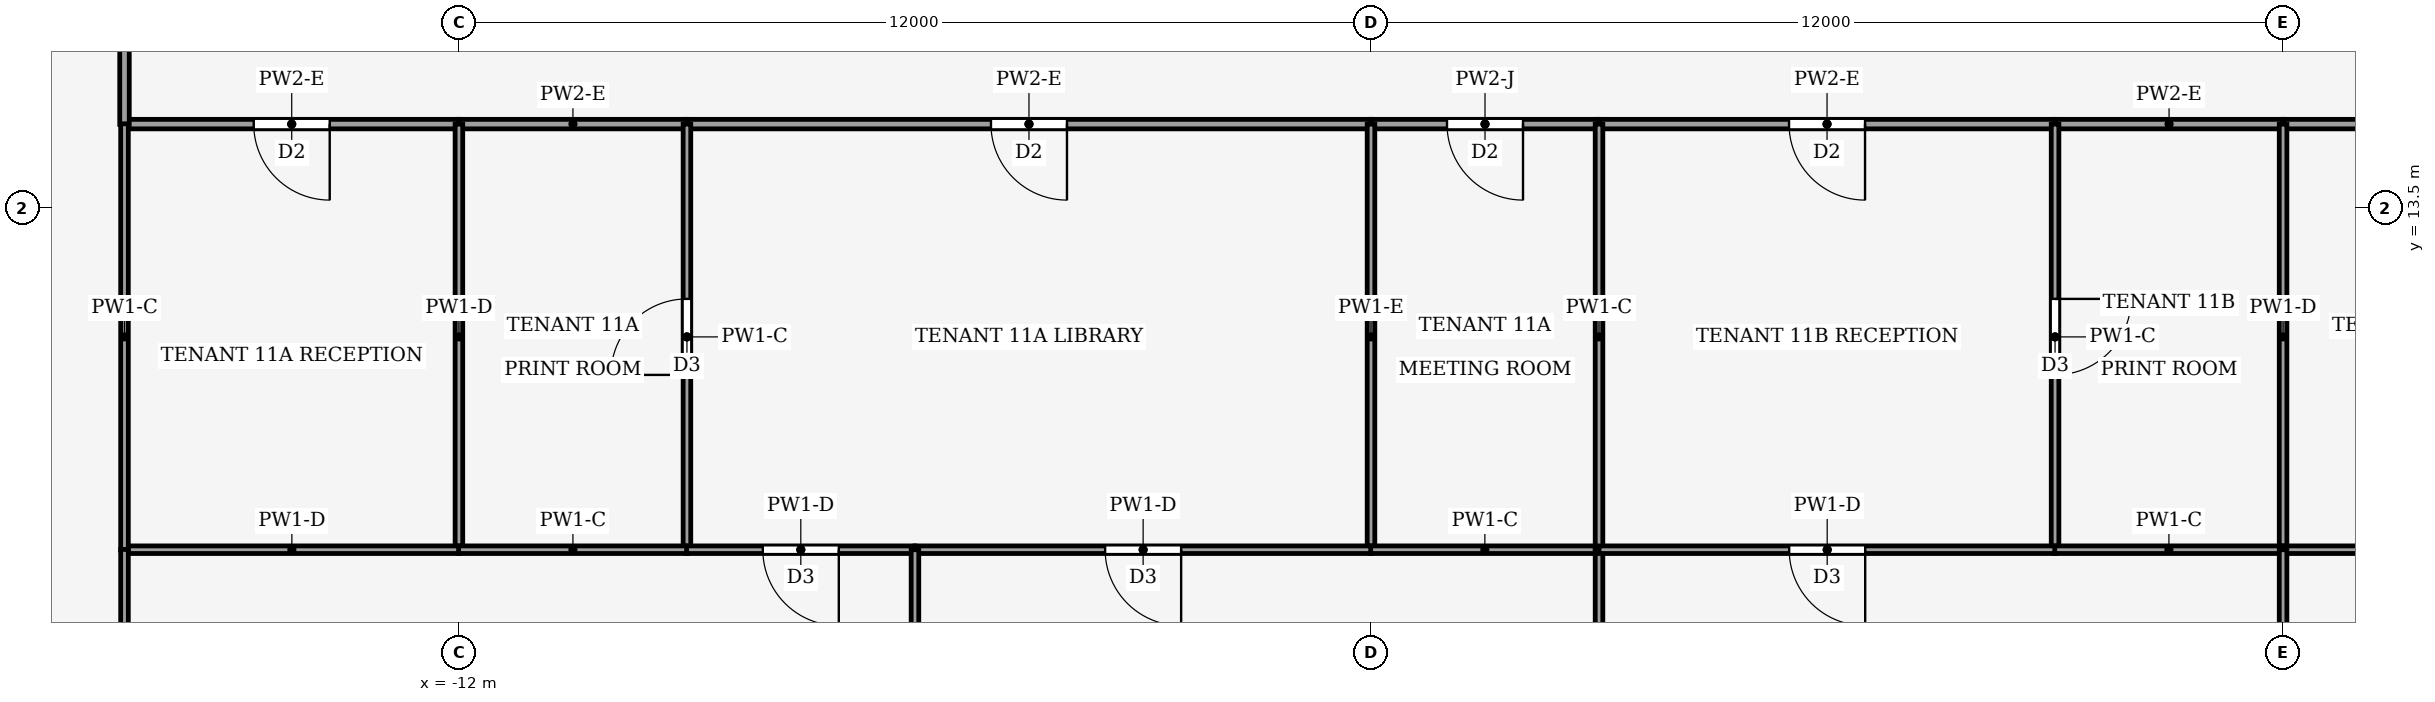
"""IFC4 building model, lengths in metres.
Left out: names, types, materials, properties, quantities, classifications, styles, units other than length and angle.
Written with IfcOpenShell. Run it as: python <this file> out.ifc"""

import sys

from ifc_helpers import new_model, si_unit, direction, frame, frame_2d, origin, place, context, subcontext, project, spatial, rectangle, extrude, element, fill, save


model = new_model("IFC4")
c1 = context("Model", 3, precision=1e-05, world=origin(), true_north=direction((0.0, 1.0)))
c2 = subcontext(c1, "Body", "Model", "MODEL_VIEW")
j1 = project(units=[si_unit("LENGTHUNIT", "METRE"), si_unit("PLANEANGLEUNIT", "RADIAN")], contexts=[c1])
p1 = place(None, origin())
s1 = spatial("IfcSite", under=j1, at=p1, CompositionType="ELEMENT")
p2 = place(p1, origin())
s2 = spatial("IfcBuilding", under=s1, at=p2, CompositionType="ELEMENT")
p3 = place(p2, frame((0.0, 0.0, 50.0)))
s3 = spatial("IfcBuildingStorey", under=s2, at=p3, CompositionType="ELEMENT", Elevation=50.0)
p4 = place(p3, frame((-12.0, 14.6, 0.0), z_axis=(0.0, 0.0, 1.0), x_axis=(-1.0, 0.0, 0.0)))
e1 = element("IfcWall", 1, at=p4, inside=s3, PredefinedType="PARTITIONING", context=c2, shape_type="SweptSolid", body=[
    extrude(rectangle(XDim=4.4, YDim=0.125, at=frame_2d((2.2, 0.0))), origin(), (0.0, 0.0, 1.0), 3.29),
])
p5 = place(p4, frame((1.7, 0.0, 0.0)))
e2 = element("IfcOpeningElement", 2, at=p5, cuts=e1, PredefinedType="OPENING", context=c2, shape_type="SweptSolid", body=[
    extrude(rectangle(XDim=1.0, YDim=2.1, at=frame_2d((0.5, 1.05))), frame((0.0, 0.073, 0.0), z_axis=(0.0, -1.0, 0.0), x_axis=(1.0, 0.0, 0.0)), (0.0, 0.0, 1.0), 0.145),
])
p6 = place(p3, frame((-12.0, 14.6, 0.0), z_axis=(0.0, 0.0, 1.0), x_axis=(1.0, 0.0, 0.0)))
e3 = element("IfcWall", 3, at=p6, inside=s3, PredefinedType="PARTITIONING", context=c2, shape_type="SweptSolid", body=[
    extrude(rectangle(XDim=3.0, YDim=0.125, at=frame_2d((1.5, 0.0))), origin(), (0.0, 0.0, 1.0), 3.29),
])
p7 = place(p3, frame((0.0, 14.6, 0.0), z_axis=(0.0, 0.0, 1.0), x_axis=(-1.0, 0.0, 0.0)))
e4 = element("IfcWall", 4, at=p7, inside=s3, PredefinedType="PARTITIONING", context=c2, shape_type="SweptSolid", body=[
    extrude(rectangle(XDim=9.0, YDim=0.125, at=frame_2d((4.5, 0.0))), origin(), (0.0, 0.0, 1.0), 3.29),
])
p8 = place(p7, frame((4.0, 0.0, 0.0)))
e5 = element("IfcOpeningElement", 5, at=p8, cuts=e4, PredefinedType="OPENING", context=c2, shape_type="SweptSolid", body=[
    extrude(rectangle(XDim=1.0, YDim=2.1, at=frame_2d((0.5, 1.05))), frame((0.0, 0.073, 0.0), z_axis=(0.0, -1.0, 0.0), x_axis=(1.0, 0.0, 0.0)), (0.0, 0.0, 1.0), 0.145),
])
p9 = place(p3, frame((3.0, 14.6, 0.0), z_axis=(0.0, 0.0, 1.0), x_axis=(-1.0, 0.0, 0.0)))
e6 = element("IfcWall", 6, at=p9, inside=s3, PredefinedType="PARTITIONING", context=c2, shape_type="SweptSolid", body=[
    extrude(rectangle(XDim=3.0, YDim=0.125, at=frame_2d((1.5, 0.0))), origin(), (0.0, 0.0, 1.0), 3.34),
])
p10 = place(p9, frame((1.0, 0.0, 0.0)))
e7 = element("IfcOpeningElement", 7, at=p10, cuts=e6, PredefinedType="OPENING", context=c2, shape_type="SweptSolid", body=[
    extrude(rectangle(XDim=1.0, YDim=2.1, at=frame_2d((0.5, 1.05))), frame((0.0, 0.073, 0.0), z_axis=(0.0, -1.0, 0.0), x_axis=(1.0, 0.0, 0.0)), (0.0, 0.0, 1.0), 0.145),
])
p11 = place(p3, frame((9.0, 14.6, 0.0), z_axis=(0.0, 0.0, 1.0), x_axis=(-1.0, 0.0, 0.0)))
e8 = element("IfcWall", 8, at=p11, inside=s3, PredefinedType="PARTITIONING", context=c2, shape_type="SweptSolid", body=[
    extrude(rectangle(XDim=6.0, YDim=0.125, at=frame_2d((3.0, 0.0))), origin(), (0.0, 0.0, 1.0), 3.29),
])
p12 = place(p11, frame((2.5, 0.0, 0.0)))
e9 = element("IfcOpeningElement", 9, at=p12, cuts=e8, PredefinedType="OPENING", context=c2, shape_type="SweptSolid", body=[
    extrude(rectangle(XDim=1.0, YDim=2.1, at=frame_2d((0.5, 1.05))), frame((0.0, 0.073, 0.0), z_axis=(0.0, -1.0, 0.0), x_axis=(1.0, 0.0, 0.0)), (0.0, 0.0, 1.0), 0.145),
])
p13 = place(p3, frame((9.0, 14.6, 0.0), z_axis=(0.0, 0.0, 1.0), x_axis=(1.0, 0.0, 0.0)))
e10 = element("IfcWall", 10, at=p13, inside=s3, PredefinedType="PARTITIONING", context=c2, shape_type="SweptSolid", body=[
    extrude(rectangle(XDim=3.0, YDim=0.125, at=frame_2d((1.5, 0.0))), origin(), (0.0, 0.0, 1.0), 3.29),
])
p14 = place(p3, frame((16.4, 14.6, 0.0), z_axis=(0.0, 0.0, 1.0), x_axis=(-1.0, 0.0, 0.0)))
e11 = element("IfcWall", 11, at=p14, inside=s3, PredefinedType="PARTITIONING", context=c2, shape_type="SweptSolid", body=[
    extrude(rectangle(XDim=4.4, YDim=0.125, at=frame_2d((2.2, 0.0))), origin(), (0.0, 0.0, 1.0), 3.29),
])
p15 = place(p14, frame((1.7, 0.0, 0.0)))
e12 = element("IfcOpeningElement", 12, at=p15, cuts=e11, PredefinedType="OPENING", context=c2, shape_type="SweptSolid", body=[
    extrude(rectangle(XDim=1.0, YDim=2.1, at=frame_2d((0.5, 1.05))), frame((0.0, 0.073, 0.0), z_axis=(0.0, -1.0, 0.0), x_axis=(1.0, 0.0, 0.0)), (0.0, 0.0, 1.0), 0.145),
])
p16 = place(p3, frame((-16.4, 14.596, 0.0), z_axis=(0.0, 0.0, 1.0), x_axis=(0.0, 1.0, 0.0)))
e13 = element("IfcWall", 13, at=p16, inside=s3, PredefinedType="PARTITIONING", context=c2, shape_type="SweptSolid", body=[
    extrude(rectangle(XDim=3.404, YDim=0.125, at=frame_2d((1.702, 0.0))), origin(), (0.0, 0.0, 1.0), 3.14),
])
p17 = place(p16, frame((1.602, 0.0, 0.0)))
e14 = element("IfcOpeningElement", 14, at=p17, cuts=e13, PredefinedType="OPENING", context=c2, shape_type="SweptSolid", body=[
    extrude(rectangle(XDim=1.0, YDim=2.1, at=frame_2d((0.5, 1.05))), frame((0.0, 0.073, 0.0), z_axis=(0.0, -1.0, 0.0), x_axis=(1.0, 0.0, 0.0)), (0.0, 0.0, 1.0), 0.145),
])
p18 = place(p3, frame((-12.0, 9.0, 0.0), z_axis=(0.0, 0.0, 1.0), x_axis=(0.0, 1.0, 0.0)))
e15 = element("IfcWall", 15, at=p18, inside=s3, PredefinedType="PARTITIONING", context=c2, shape_type="SweptSolid", body=[
    extrude(rectangle(XDim=5.6, YDim=0.1, at=frame_2d((2.8, 0.0))), origin(), (0.0, 0.0, 1.0), 3.29),
])
p19 = place(p3, frame((-16.4, 9.0, 0.0), z_axis=(0.0, 0.0, 1.0), x_axis=(1.0, 0.0, 0.0)))
e16 = element("IfcWall", 16, at=p19, inside=s3, PredefinedType="PARTITIONING", context=c2, shape_type="SweptSolid", body=[
    extrude(rectangle(XDim=4.404, YDim=0.1, at=frame_2d((2.202, 0.0))), origin(), (0.0, 0.0, 1.0), 3.29),
])
p20 = place(p3, frame((-16.4, 14.604, 0.0), z_axis=(0.0, 0.0, 1.0), x_axis=(0.0, -1.0, 0.0)))
e17 = element("IfcWall", 17, at=p20, inside=s3, PredefinedType="PARTITIONING", context=c2, shape_type="SweptSolid", body=[
    extrude(rectangle(XDim=5.608, YDim=0.1, at=frame_2d((2.804, 0.0))), origin(), (0.0, 0.0, 1.0), 3.87),
])
p21 = place(p3, frame((-9.0, 9.0, 0.0), z_axis=(0.0, 0.0, 1.0), x_axis=(0.0, 1.0, 0.0)))
e18 = element("IfcWall", 18, at=p21, inside=s3, PredefinedType="PARTITIONING", context=c2, shape_type="SweptSolid", body=[
    extrude(rectangle(XDim=5.6, YDim=0.1, at=frame_2d((2.8, 0.0))), origin(), (0.0, 0.0, 1.0), 3.87),
])
p22 = place(p21, frame((2.3, 0.0, 0.0)))
e19 = element("IfcOpeningElement", 19, at=p22, cuts=e18, PredefinedType="OPENING", context=c2, shape_type="SweptSolid", body=[
    extrude(rectangle(XDim=1.0, YDim=2.1, at=frame_2d((0.5, 1.05))), frame((0.0, 0.06, 0.0), z_axis=(0.0, -1.0, 0.0), x_axis=(1.0, 0.0, 0.0)), (0.0, 0.0, 1.0), 0.12),
])
p23 = place(p3, frame((-12.004, 9.0, 0.0), z_axis=(0.0, 0.0, 1.0), x_axis=(1.0, 0.0, 0.0)))
e20 = element("IfcWall", 20, at=p23, inside=s3, PredefinedType="PARTITIONING", context=c2, shape_type="SweptSolid", body=[
    extrude(rectangle(XDim=3.008, YDim=0.1, at=frame_2d((1.504, 0.0))), origin(), (0.0, 0.0, 1.0), 3.87),
])
p24 = place(p3, frame((0.0, 9.0, 0.0), z_axis=(0.0, 0.0, 1.0), x_axis=(0.0, 1.0, 0.0)))
e21 = element("IfcWall", 21, at=p24, inside=s3, PredefinedType="PARTITIONING", context=c2, shape_type="SweptSolid", body=[
    extrude(rectangle(XDim=5.6, YDim=0.1, at=frame_2d((2.8, 0.0))), origin(), (0.0, 0.0, 1.0), 3.34),
])
p25 = place(p3, frame((-6.0, 9.0, 0.0), z_axis=(0.0, 0.0, 1.0), x_axis=(-1.0, 0.0, 0.0)))
e22 = element("IfcWall", 22, at=p25, inside=s3, PredefinedType="PARTITIONING", context=c2, shape_type="SweptSolid", body=[
    extrude(rectangle(XDim=3.004, YDim=0.1, at=frame_2d((1.502, 0.0))), origin(), (0.0, 0.0, 1.0), 3.29),
])
p26 = place(p25, frame((1.002, 0.0, 0.0)))
e23 = element("IfcOpeningElement", 23, at=p26, cuts=e22, PredefinedType="OPENING", context=c2, shape_type="SweptSolid", body=[
    extrude(rectangle(XDim=1.0, YDim=2.1, at=frame_2d((0.5, 1.05))), frame((0.0, 0.06, 0.0), z_axis=(0.0, -1.0, 0.0), x_axis=(1.0, 0.0, 0.0)), (0.0, 0.0, 1.0), 0.12),
])
p27 = place(p3, frame((0.004, 9.0, 0.0), z_axis=(0.0, 0.0, 1.0), x_axis=(-1.0, 0.0, 0.0)))
e24 = element("IfcWall", 24, at=p27, inside=s3, PredefinedType="PARTITIONING", context=c2, shape_type="SweptSolid", body=[
    extrude(rectangle(XDim=6.004, YDim=0.1, at=frame_2d((3.002, 0.0))), origin(), (0.0, 0.0, 1.0), 3.29),
])
p28 = place(p27, frame((2.502, 0.0, 0.0)))
e25 = element("IfcOpeningElement", 25, at=p28, cuts=e24, PredefinedType="OPENING", context=c2, shape_type="SweptSolid", body=[
    extrude(rectangle(XDim=1.0, YDim=2.1, at=frame_2d((0.5, 1.05))), frame((0.0, 0.06, 0.0), z_axis=(0.0, -1.0, 0.0), x_axis=(1.0, 0.0, 0.0)), (0.0, 0.0, 1.0), 0.12),
])
p29 = place(p3, frame((-0.004, 9.0, 0.0), z_axis=(0.0, 0.0, 1.0), x_axis=(1.0, 0.0, 0.0)))
e26 = element("IfcWall", 26, at=p29, inside=s3, PredefinedType="PARTITIONING", context=c2, shape_type="SweptSolid", body=[
    extrude(rectangle(XDim=3.004, YDim=0.1, at=frame_2d((1.502, 0.0))), origin(), (0.0, 0.0, 1.0), 3.87),
])
p30 = place(p3, frame((3.0, 9.0, 0.0), z_axis=(0.0, 0.0, 1.0), x_axis=(0.0, 1.0, 0.0)))
e27 = element("IfcWall", 27, at=p30, inside=s3, PredefinedType="PARTITIONING", context=c2, shape_type="SweptSolid", body=[
    extrude(rectangle(XDim=5.6, YDim=0.1, at=frame_2d((2.8, 0.0))), origin(), (0.0, 0.0, 1.0), 3.87),
])
p31 = place(p3, frame((-6.0, 0.92, 0.0), z_axis=(0.0, 0.0, 1.0), x_axis=(0.0, 1.0, 0.0)))
e28 = element("IfcWall", 28, at=p31, inside=s3, PredefinedType="PARTITIONING", context=c2, shape_type="SweptSolid", body=[
    extrude(rectangle(XDim=8.08, YDim=0.1, at=frame_2d((4.04, 0.0))), origin(), (0.0, 0.0, 1.0), 3.04),
])
p32 = place(p3, frame((-16.4, 9.004, 0.0), z_axis=(0.0, 0.0, 1.0), x_axis=(0.0, -1.0, 0.0)))
e29 = element("IfcWall", 29, at=p32, inside=s3, PredefinedType="PARTITIONING", context=c2, shape_type="SweptSolid", body=[
    extrude(rectangle(XDim=8.951, YDim=0.1, at=frame_2d((4.475, 0.0))), origin(), (0.0, 0.0, 1.0), 3.04),
])
p33 = place(p3, frame((3.0, 1.17, 0.0), z_axis=(0.0, 0.0, 1.0), x_axis=(0.0, 1.0, 0.0)))
e30 = element("IfcWall", 30, at=p33, inside=s3, PredefinedType="PARTITIONING", context=c2, shape_type="SweptSolid", body=[
    extrude(rectangle(XDim=7.83, YDim=0.1, at=frame_2d((3.915, 0.0))), origin(), (0.0, 0.0, 1.0), 3.04),
])
p34 = place(p3, frame((9.0, 14.6, 0.0), z_axis=(0.0, 0.0, 1.0), x_axis=(0.0, -1.0, 0.0)))
e31 = element("IfcWall", 31, at=p34, inside=s3, PredefinedType="PARTITIONING", context=c2, shape_type="SweptSolid", body=[
    extrude(rectangle(XDim=5.6, YDim=0.1, at=frame_2d((2.8, 0.0))), origin(), (0.0, 0.0, 1.0), 3.87),
])
p35 = place(p34, frame((2.3, 0.0, 0.0)))
e32 = element("IfcOpeningElement", 32, at=p35, cuts=e31, PredefinedType="OPENING", context=c2, shape_type="SweptSolid", body=[
    extrude(rectangle(XDim=1.0, YDim=2.1, at=frame_2d((0.5, 1.05))), frame((0.0, 0.06, 0.0), z_axis=(0.0, -1.0, 0.0), x_axis=(1.0, 0.0, 0.0)), (0.0, 0.0, 1.0), 0.12),
])
p36 = place(p3, frame((9.004, 9.0, 0.0), z_axis=(0.0, 0.0, 1.0), x_axis=(-1.0, 0.0, 0.0)))
e33 = element("IfcWall", 33, at=p36, inside=s3, PredefinedType="PARTITIONING", context=c2, shape_type="SweptSolid", body=[
    extrude(rectangle(XDim=6.004, YDim=0.1, at=frame_2d((3.002, 0.0))), origin(), (0.0, 0.0, 1.0), 3.29),
])
p37 = place(p36, frame((2.502, 0.0, 0.0)))
e34 = element("IfcOpeningElement", 34, at=p37, cuts=e33, PredefinedType="OPENING", context=c2, shape_type="SweptSolid", body=[
    extrude(rectangle(XDim=1.0, YDim=2.1, at=frame_2d((0.5, 1.05))), frame((0.0, 0.06, 0.0), z_axis=(0.0, -1.0, 0.0), x_axis=(1.0, 0.0, 0.0)), (0.0, 0.0, 1.0), 0.12),
])
p38 = place(p3, frame((12.0, 9.0, 0.0), z_axis=(0.0, 0.0, 1.0), x_axis=(0.0, 1.0, 0.0)))
e35 = element("IfcWall", 35, at=p38, inside=s3, PredefinedType="PARTITIONING", context=c2, shape_type="SweptSolid", body=[
    extrude(rectangle(XDim=5.6, YDim=0.1, at=frame_2d((2.8, 0.0))), origin(), (0.0, 0.0, 1.0), 3.29),
])
p39 = place(p3, frame((8.996, 9.0, 0.0), z_axis=(0.0, 0.0, 1.0), x_axis=(1.0, 0.0, 0.0)))
e36 = element("IfcWall", 36, at=p39, inside=s3, PredefinedType="PARTITIONING", context=c2, shape_type="SweptSolid", body=[
    extrude(rectangle(XDim=3.004, YDim=0.1, at=frame_2d((1.502, 0.0))), origin(), (0.0, 0.0, 1.0), 3.87),
])
p40 = place(p3, frame((12.0, 9.0, 0.0), z_axis=(0.0, 0.0, 1.0), x_axis=(1.0, 0.0, 0.0)))
e37 = element("IfcWall", 37, at=p40, inside=s3, PredefinedType="PARTITIONING", context=c2, shape_type="SweptSolid", body=[
    extrude(rectangle(XDim=4.4, YDim=0.1, at=frame_2d((2.2, 0.0))), origin(), (0.0, 0.0, 1.0), 3.29),
])
p41 = place(p3, frame((12.0, 9.0, 0.0), z_axis=(0.0, 0.0, 1.0), x_axis=(0.0, -1.0, 0.0)))
e38 = element("IfcWall", 38, at=p41, inside=s3, PredefinedType="PARTITIONING", context=c2, shape_type="SweptSolid", body=[
    extrude(rectangle(XDim=8.58, YDim=0.1, at=frame_2d((4.29, 0.0))), origin(), (0.0, 0.0, 1.0), 3.04),
])
p42 = place(p41, frame((2.925, 0.0, 0.0)))
e39 = element("IfcOpeningElement", 39, at=p42, cuts=e38, PredefinedType="OPENING", context=c2, shape_type="SweptSolid", body=[
    extrude(rectangle(XDim=1.0, YDim=2.1, at=frame_2d((0.5, 1.05))), frame((0.0, 0.06, 0.0), z_axis=(0.0, -1.0, 0.0), x_axis=(1.0, 0.0, 0.0)), (0.0, 0.0, 1.0), 0.12),
])
p43 = place(p5, origin())
e40 = element("IfcDoor", 40, at=p43, inside=s3, OperationType="SINGLE_SWING_LEFT", PredefinedType="DOOR", context=c2, shape_type="SweptSolid", body=[
    extrude(rectangle(XDim=1.0, YDim=2.1, at=frame_2d((0.5, 1.05))), frame((0.0, 0.025, 0.0), z_axis=(0.0, -1.0, 0.0), x_axis=(1.0, 0.0, 0.0)), (0.0, 0.0, 1.0), 0.05),
])
fill(e2, e40)
p44 = place(p8, origin())
e41 = element("IfcDoor", 41, at=p44, inside=s3, OperationType="SINGLE_SWING_RIGHT", PredefinedType="DOOR", context=c2, shape_type="SweptSolid", body=[
    extrude(rectangle(XDim=1.0, YDim=2.1, at=frame_2d((0.5, 1.05))), frame((0.0, 0.025, 0.0), z_axis=(0.0, -1.0, 0.0), x_axis=(1.0, 0.0, 0.0)), (0.0, 0.0, 1.0), 0.05),
])
fill(e5, e41)
p45 = place(p10, origin())
e42 = element("IfcDoor", 42, at=p45, inside=s3, OperationType="SINGLE_SWING_LEFT", PredefinedType="DOOR", context=c2, shape_type="SweptSolid", body=[
    extrude(rectangle(XDim=1.0, YDim=2.1, at=frame_2d((0.5, 1.05))), frame((0.0, 0.025, 0.0), z_axis=(0.0, -1.0, 0.0), x_axis=(1.0, 0.0, 0.0)), (0.0, 0.0, 1.0), 0.05),
])
fill(e7, e42)
p46 = place(p12, origin())
e43 = element("IfcDoor", 43, at=p46, inside=s3, OperationType="SINGLE_SWING_RIGHT", PredefinedType="DOOR", context=c2, shape_type="SweptSolid", body=[
    extrude(rectangle(XDim=1.0, YDim=2.1, at=frame_2d((0.5, 1.05))), frame((0.0, 0.025, 0.0), z_axis=(0.0, -1.0, 0.0), x_axis=(1.0, 0.0, 0.0)), (0.0, 0.0, 1.0), 0.05),
])
fill(e9, e43)
p47 = place(p22, origin())
e44 = element("IfcDoor", 44, at=p47, inside=s3, OperationType="SINGLE_SWING_LEFT", PredefinedType="DOOR", context=c2, shape_type="SweptSolid", body=[
    extrude(rectangle(XDim=1.0, YDim=2.1, at=frame_2d((0.5, 1.05))), frame((0.0, 0.025, 0.0), z_axis=(0.0, -1.0, 0.0), x_axis=(1.0, 0.0, 0.0)), (0.0, 0.0, 1.0), 0.05),
])
fill(e19, e44)
p48 = place(p26, origin())
e45 = element("IfcDoor", 45, at=p48, inside=s3, OperationType="SINGLE_SWING_RIGHT", PredefinedType="DOOR", context=c2, shape_type="SweptSolid", body=[
    extrude(rectangle(XDim=1.0, YDim=2.1, at=frame_2d((0.5, 1.05))), frame((0.0, 0.025, 0.0), z_axis=(0.0, -1.0, 0.0), x_axis=(1.0, 0.0, 0.0)), (0.0, 0.0, 1.0), 0.05),
])
fill(e23, e45)
p49 = place(p28, origin())
e46 = element("IfcDoor", 46, at=p49, inside=s3, OperationType="SINGLE_SWING_LEFT", PredefinedType="DOOR", context=c2, shape_type="SweptSolid", body=[
    extrude(rectangle(XDim=1.0, YDim=2.1, at=frame_2d((0.5, 1.05))), frame((0.0, 0.025, 0.0), z_axis=(0.0, -1.0, 0.0), x_axis=(1.0, 0.0, 0.0)), (0.0, 0.0, 1.0), 0.05),
])
fill(e25, e46)
p50 = place(p35, origin())
e47 = element("IfcDoor", 47, at=p50, inside=s3, OperationType="SINGLE_SWING_RIGHT", PredefinedType="DOOR", context=c2, shape_type="SweptSolid", body=[
    extrude(rectangle(XDim=1.0, YDim=2.1, at=frame_2d((0.5, 1.05))), frame((0.0, 0.025, 0.0), z_axis=(0.0, -1.0, 0.0), x_axis=(1.0, 0.0, 0.0)), (0.0, 0.0, 1.0), 0.05),
])
fill(e32, e47)
p51 = place(p37, origin())
e48 = element("IfcDoor", 48, at=p51, inside=s3, OperationType="SINGLE_SWING_LEFT", PredefinedType="DOOR", context=c2, shape_type="SweptSolid", body=[
    extrude(rectangle(XDim=1.0, YDim=2.1, at=frame_2d((0.5, 1.05))), frame((0.0, 0.025, 0.0), z_axis=(0.0, -1.0, 0.0), x_axis=(1.0, 0.0, 0.0)), (0.0, 0.0, 1.0), 0.05),
])
fill(e34, e48)
save(model, sys.argv[1])
